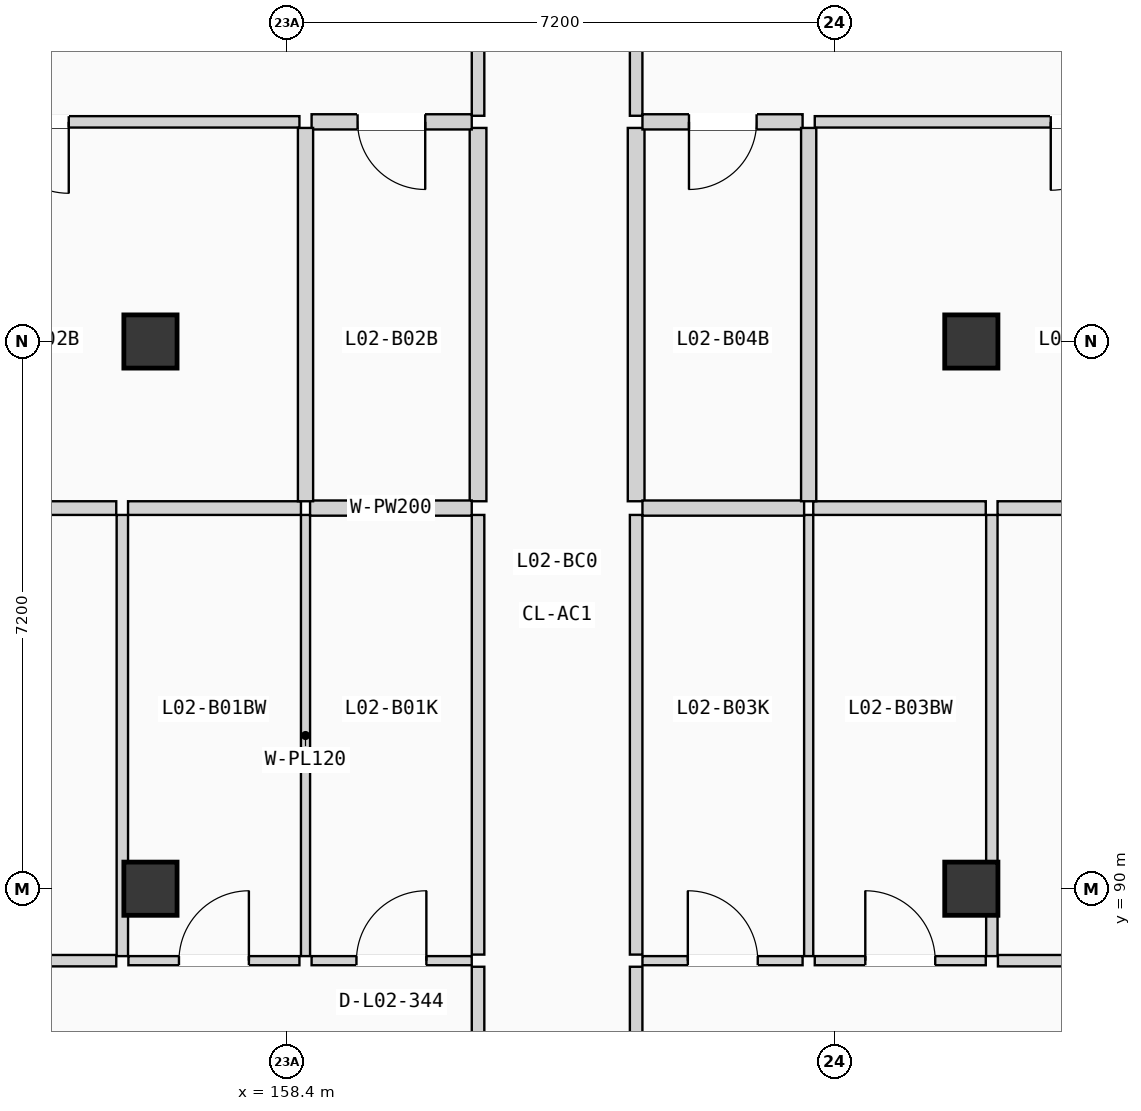
"""IFC4 building model, lengths in metres.
Left out: names, types, materials, properties, quantities, classifications, styles, units other than length and angle.
Written with IfcOpenShell. Run it as: python <this file> out.ifc"""

import sys

from ifc_helpers import new_model, si_unit, direction, frame, frame_2d, origin, origin_2d, place, context, subcontext, project, spatial, rectangle, extrude, element, fill, save


model = new_model("IFC4")
c1 = context("Model", 3, precision=1e-05, world=origin(), true_north=direction((0.0, 1.0)))
c2 = subcontext(c1, "Body", "Model", "MODEL_VIEW")
j1 = project(units=[si_unit("LENGTHUNIT", "METRE"), si_unit("PLANEANGLEUNIT", "RADIAN")], contexts=[c1])
p1 = place(None, origin())
s1 = spatial("IfcSite", under=j1, at=p1, CompositionType="ELEMENT")
p2 = place(p1, origin())
s2 = spatial("IfcBuilding", under=s1, at=p2, CompositionType="ELEMENT")
p3 = place(p2, frame((0.0, 0.0, 8.575)))
s3 = spatial("IfcBuildingStorey", under=s2, at=p3, CompositionType="ELEMENT", Elevation=8.575)
for number, where, z_axis, x_axis in (
    (1, (156.6, 90.0, 0.0), (0.0, 0.0, 1.0), (1.0, 0.0, 0.0)),
    (2, (156.6, 97.2, 0.0), (0.0, 0.0, 1.0), (1.0, 0.0, 0.0)),
    (3, (167.4, 90.0, 0.0), (0.0, 0.0, 1.0), (1.0, 0.0, 0.0)),
    (4, (167.4, 97.2, 0.0), (0.0, 0.0, 1.0), (1.0, 0.0, 0.0)),
):
    element("IfcColumn", number, at=place(p3, frame(where, z_axis=z_axis, x_axis=x_axis)), inside=s3, PredefinedType="COLUMN", context=c2, shape_type="SweptSolid", body=[
        extrude(rectangle(XDim=0.7, YDim=0.7, at=origin_2d()), origin(), (0.0, 0.0, 1.0), 3.5),
    ])
p4 = place(p3, frame((160.91, 81.945, 0.0), z_axis=(0.0, 0.0, 1.0), x_axis=(0.0, 1.0, 0.0)))
e5 = element("IfcWall", 5, at=p4, inside=s3, PredefinedType="PARTITIONING", context=c2, shape_type="SweptSolid", body=[
    extrude(rectangle(XDim=7.028, YDim=0.165, at=frame_2d((3.514, 0.0))), origin(), (0.0, 0.0, 1.0), 3.22),
])
p5 = place(p4, frame((3.009, 0.0, 0.0)))
e6 = element("IfcOpeningElement", 6, at=p5, cuts=e5, PredefinedType="OPENING", context=c2, shape_type="SweptSolid", body=[
    extrude(rectangle(XDim=1.01, YDim=2.11, at=frame_2d((0.505, 1.055))), frame((0.0, 0.093, 0.0), z_axis=(0.0, -1.0, 0.0), x_axis=(1.0, 0.0, 0.0)), (0.0, 0.0, 1.0), 0.185),
])
p6 = place(p3, frame((160.91, 89.133, 0.0), z_axis=(0.0, 0.0, 1.0), x_axis=(0.0, 1.0, 0.0)))
e7 = element("IfcWall", 7, at=p6, inside=s3, PredefinedType="PARTITIONING", context=c2, shape_type="SweptSolid", body=[
    extrude(rectangle(XDim=5.785, YDim=0.165, at=frame_2d((2.893, 0.0))), origin(), (0.0, 0.0, 1.0), 3.22),
])
p7 = place(p3, frame((160.91, 100.17, 0.0), z_axis=(0.0, 0.0, 1.0), x_axis=(0.0, 1.0, 0.0)))
e8 = element("IfcWall", 8, at=p7, inside=s3, PredefinedType="PARTITIONING", context=c2, shape_type="SweptSolid", body=[
    extrude(rectangle(XDim=5.958, YDim=0.165, at=frame_2d((2.979, 0.0))), origin(), (0.0, 0.0, 1.0), 3.22),
])
p8 = place(p7, frame((2.474, 0.0, 0.0)))
e9 = element("IfcOpeningElement", 9, at=p8, cuts=e8, PredefinedType="OPENING", context=c2, shape_type="SweptSolid", body=[
    extrude(rectangle(XDim=1.01, YDim=2.11, at=frame_2d((0.505, 1.055))), frame((0.0, 0.093, 0.0), z_axis=(0.0, -1.0, 0.0), x_axis=(1.0, 0.0, 0.0)), (0.0, 0.0, 1.0), 0.185),
])
p9 = place(p3, frame((160.91, 95.098, 0.0), z_axis=(0.0, 0.0, 1.0), x_axis=(0.0, 1.0, 0.0)))
e10 = element("IfcWall", 10, at=p9, inside=s3, PredefinedType="PLUMBINGWALL", context=c2, shape_type="SweptSolid", body=[
    extrude(rectangle(XDim=4.912, YDim=0.22, at=frame_2d((2.456, 0.0))), origin(), (0.0, 0.0, 1.0), 3.22),
])
p10 = place(p3, frame((162.99, 81.945, 0.0), z_axis=(0.0, 0.0, 1.0), x_axis=(0.0, 1.0, 0.0)))
e11 = element("IfcWall", 11, at=p10, inside=s3, PredefinedType="PARTITIONING", context=c2, shape_type="SweptSolid", body=[
    extrude(rectangle(XDim=7.028, YDim=0.165, at=frame_2d((3.514, 0.0))), origin(), (0.0, 0.0, 1.0), 3.22),
])
p11 = place(p10, frame((3.009, 0.0, 0.0)))
e12 = element("IfcOpeningElement", 12, at=p11, cuts=e11, PredefinedType="OPENING", context=c2, shape_type="SweptSolid", body=[
    extrude(rectangle(XDim=1.01, YDim=2.11, at=frame_2d((0.505, 1.055))), frame((0.0, 0.093, 0.0), z_axis=(0.0, -1.0, 0.0), x_axis=(1.0, 0.0, 0.0)), (0.0, 0.0, 1.0), 0.185),
])
p12 = place(p3, frame((162.99, 89.133, 0.0), z_axis=(0.0, 0.0, 1.0), x_axis=(0.0, 1.0, 0.0)))
e13 = element("IfcWall", 13, at=p12, inside=s3, PredefinedType="PARTITIONING", context=c2, shape_type="SweptSolid", body=[
    extrude(rectangle(XDim=5.785, YDim=0.165, at=frame_2d((2.893, 0.0))), origin(), (0.0, 0.0, 1.0), 3.22),
])
p13 = place(p3, frame((162.99, 100.17, 0.0), z_axis=(0.0, 0.0, 1.0), x_axis=(0.0, 1.0, 0.0)))
e14 = element("IfcWall", 14, at=p13, inside=s3, PredefinedType="PARTITIONING", context=c2, shape_type="SweptSolid", body=[
    extrude(rectangle(XDim=5.958, YDim=0.165, at=frame_2d((2.979, 0.0))), origin(), (0.0, 0.0, 1.0), 3.22),
])
p14 = place(p13, frame((2.474, 0.0, 0.0)))
e15 = element("IfcOpeningElement", 15, at=p14, cuts=e14, PredefinedType="OPENING", context=c2, shape_type="SweptSolid", body=[
    extrude(rectangle(XDim=1.01, YDim=2.11, at=frame_2d((0.505, 1.055))), frame((0.0, 0.093, 0.0), z_axis=(0.0, -1.0, 0.0), x_axis=(1.0, 0.0, 0.0)), (0.0, 0.0, 1.0), 0.185),
])
p15 = place(p3, frame((162.99, 95.098, 0.0), z_axis=(0.0, 0.0, 1.0), x_axis=(0.0, 1.0, 0.0)))
e16 = element("IfcWall", 16, at=p15, inside=s3, PredefinedType="PLUMBINGWALL", context=c2, shape_type="SweptSolid", body=[
    extrude(rectangle(XDim=4.912, YDim=0.22, at=frame_2d((2.456, 0.0))), origin(), (0.0, 0.0, 1.0), 3.22),
])
p16 = place(p3, frame((158.72, 89.053, 0.0), z_axis=(0.0, 0.0, 1.0), x_axis=(1.0, 0.0, 0.0)))
e17 = element("IfcWall", 17, at=p16, inside=s3, PredefinedType="PARTITIONING", context=c2, shape_type="SweptSolid", body=[
    extrude(rectangle(XDim=2.107, YDim=0.12, at=frame_2d((1.053, 0.0))), origin(), (0.0, 0.0, 1.0), 3.22),
])
p17 = place(p16, frame((0.59, 0.0, 0.0)))
e18 = element("IfcOpeningElement", 18, at=p17, cuts=e17, PredefinedType="OPENING", context=c2, shape_type="SweptSolid", body=[
    extrude(rectangle(XDim=0.92, YDim=2.02, at=frame_2d((0.46, 1.01))), frame((0.0, 0.07, 0.0), z_axis=(0.0, -1.0, 0.0), x_axis=(1.0, 0.0, 0.0)), (0.0, 0.0, 1.0), 0.14),
])
p18 = place(p3, frame((151.54, 89.053, 0.0), z_axis=(0.0, 0.0, 1.0), x_axis=(1.0, 0.0, 0.0)))
e19 = element("IfcWall", 19, at=p18, inside=s3, PredefinedType="PARTITIONING", context=c2, shape_type="SweptSolid", body=[
    extrude(rectangle(XDim=4.61, YDim=0.15, at=frame_2d((2.305, 0.0))), origin(), (0.0, 0.0, 1.0), 3.22),
])
p19 = place(p18, frame((1.77, 0.0, 0.0)))
e20 = element("IfcOpeningElement", 20, at=p19, cuts=e19, PredefinedType="OPENING", context=c2, shape_type="SweptSolid", body=[
    extrude(rectangle(XDim=1.08, YDim=2.1, at=frame_2d((0.54, 1.05))), frame((0.0, 0.085, 0.0), z_axis=(0.0, -1.0, 0.0), x_axis=(1.0, 0.0, 0.0)), (0.0, 0.0, 1.0), 0.17),
])
p20 = place(p3, frame((156.31, 89.053, 0.0), z_axis=(0.0, 0.0, 1.0), x_axis=(1.0, 0.0, 0.0)))
e21 = element("IfcWall", 21, at=p20, inside=s3, PredefinedType="PARTITIONING", context=c2, shape_type="SweptSolid", body=[
    extrude(rectangle(XDim=2.25, YDim=0.12, at=frame_2d((1.125, 0.0))), origin(), (0.0, 0.0, 1.0), 3.22),
])
p21 = place(p20, frame((0.665, 0.0, 0.0)))
e22 = element("IfcOpeningElement", 22, at=p21, cuts=e21, PredefinedType="OPENING", context=c2, shape_type="SweptSolid", body=[
    extrude(rectangle(XDim=0.92, YDim=2.02, at=frame_2d((0.46, 1.01))), frame((0.0, 0.07, 0.0), z_axis=(0.0, -1.0, 0.0), x_axis=(1.0, 0.0, 0.0)), (0.0, 0.0, 1.0), 0.14),
])
p22 = place(p3, frame((158.64, 89.113, 0.0), z_axis=(0.0, 0.0, 1.0), x_axis=(0.0, 1.0, 0.0)))
e23 = element("IfcWall", 23, at=p22, inside=s3, PredefinedType="PARTITIONING", context=c2, shape_type="SweptSolid", body=[
    extrude(rectangle(XDim=5.805, YDim=0.12, at=frame_2d((2.902, 0.0))), origin(), (0.0, 0.0, 1.0), 3.22),
])
p23 = place(p3, frame((158.7, 95.008, 0.0), z_axis=(0.0, 0.0, 1.0), x_axis=(1.0, 0.0, 0.0)))
e24 = element("IfcWall", 24, at=p23, inside=s3, PredefinedType="PLUMBINGWALL", context=c2, shape_type="SweptSolid", body=[
    extrude(rectangle(XDim=2.127, YDim=0.2, at=frame_2d((1.063, 0.0))), origin(), (0.0, 0.0, 1.0), 3.22),
])
p24 = place(p3, frame((156.23, 89.113, 0.0), z_axis=(0.0, 0.0, 1.0), x_axis=(0.0, 1.0, 0.0)))
e25 = element("IfcWall", 25, at=p24, inside=s3, PredefinedType="PARTITIONING", context=c2, shape_type="SweptSolid", body=[
    extrude(rectangle(XDim=5.805, YDim=0.15, at=frame_2d((2.902, 0.0))), origin(), (0.0, 0.0, 1.0), 3.22),
])
p25 = place(p3, frame((151.54, 95.008, 0.0), z_axis=(0.0, 0.0, 1.0), x_axis=(1.0, 0.0, 0.0)))
e26 = element("IfcWall", 26, at=p25, inside=s3, PredefinedType="PARTITIONING", context=c2, shape_type="SweptSolid", body=[
    extrude(rectangle(XDim=4.61, YDim=0.18, at=frame_2d((2.305, 0.0))), origin(), (0.0, 0.0, 1.0), 3.22),
])
p26 = place(p3, frame((156.305, 95.008, 0.0), z_axis=(0.0, 0.0, 1.0), x_axis=(1.0, 0.0, 0.0)))
e27 = element("IfcWall", 27, at=p26, inside=s3, PredefinedType="PARTITIONING", context=c2, shape_type="SweptSolid", body=[
    extrude(rectangle(XDim=2.275, YDim=0.18, at=frame_2d((1.138, 0.0))), origin(), (0.0, 0.0, 1.0), 3.22),
])
p27 = place(p3, frame((158.72, 100.09, 0.0), z_axis=(0.0, 0.0, 1.0), x_axis=(1.0, 0.0, 0.0)))
e28 = element("IfcWall", 28, at=p27, inside=s3, PredefinedType="PLUMBINGWALL", context=c2, shape_type="SweptSolid", body=[
    extrude(rectangle(XDim=2.107, YDim=0.2, at=frame_2d((1.053, 0.0))), origin(), (0.0, 0.0, 1.0), 3.22),
])
p28 = place(p27, frame((0.605, 0.0, 0.0)))
e29 = element("IfcOpeningElement", 29, at=p28, cuts=e28, PredefinedType="OPENING", context=c2, shape_type="SweptSolid", body=[
    extrude(rectangle(XDim=0.89, YDim=2.03, at=frame_2d((0.445, 1.015))), frame((0.0, 0.11, 0.0), z_axis=(0.0, -1.0, 0.0), x_axis=(1.0, 0.0, 0.0)), (0.0, 0.0, 1.0), 0.22),
])
p29 = place(p3, frame((151.54, 100.09, 0.0), z_axis=(0.0, 0.0, 1.0), x_axis=(1.0, 0.0, 0.0)))
e30 = element("IfcWall", 30, at=p29, inside=s3, PredefinedType="PARTITIONING", context=c2, shape_type="SweptSolid", body=[
    extrude(rectangle(XDim=7.02, YDim=0.15, at=frame_2d((3.51, 0.0))), origin(), (0.0, 0.0, 1.0), 3.22),
])
p30 = place(p29, frame((3.045, 0.0, 0.0)))
e31 = element("IfcOpeningElement", 31, at=p30, cuts=e30, PredefinedType="OPENING", context=c2, shape_type="SweptSolid", body=[
    extrude(rectangle(XDim=0.94, YDim=2.06, at=frame_2d((0.47, 1.03))), frame((0.0, 0.085, 0.0), z_axis=(0.0, -1.0, 0.0), x_axis=(1.0, 0.0, 0.0)), (0.0, 0.0, 1.0), 0.17),
])
p31 = place(p3, frame((158.64, 95.098, 0.0), z_axis=(0.0, 0.0, 1.0), x_axis=(0.0, 1.0, 0.0)))
e32 = element("IfcWall", 32, at=p31, inside=s3, PredefinedType="PLUMBINGWALL", context=c2, shape_type="SweptSolid", body=[
    extrude(rectangle(XDim=4.912, YDim=0.2, at=frame_2d((2.456, 0.0))), origin(), (0.0, 0.0, 1.0), 3.22),
])
p32 = place(p3, frame((163.073, 89.053, 0.0), z_axis=(0.0, 0.0, 1.0), x_axis=(1.0, 0.0, 0.0)))
e33 = element("IfcWall", 33, at=p32, inside=s3, PredefinedType="PARTITIONING", context=c2, shape_type="SweptSolid", body=[
    extrude(rectangle(XDim=2.107, YDim=0.12, at=frame_2d((1.053, 0.0))), origin(), (0.0, 0.0, 1.0), 3.22),
])
p33 = place(p32, frame((0.597, 0.0, 0.0)))
e34 = element("IfcOpeningElement", 34, at=p33, cuts=e33, PredefinedType="OPENING", context=c2, shape_type="SweptSolid", body=[
    extrude(rectangle(XDim=0.92, YDim=2.02, at=frame_2d((0.46, 1.01))), frame((0.0, 0.07, 0.0), z_axis=(0.0, -1.0, 0.0), x_axis=(1.0, 0.0, 0.0)), (0.0, 0.0, 1.0), 0.14),
])
p34 = place(p3, frame((167.75, 89.053, 0.0), z_axis=(0.0, 0.0, 1.0), x_axis=(1.0, 0.0, 0.0)))
e35 = element("IfcWall", 35, at=p34, inside=s3, PredefinedType="PARTITIONING", context=c2, shape_type="SweptSolid", body=[
    extrude(rectangle(XDim=4.71, YDim=0.15, at=frame_2d((2.355, 0.0))), origin(), (0.0, 0.0, 1.0), 3.22),
])
p35 = place(p34, frame((1.83, 0.0, 0.0)))
e36 = element("IfcOpeningElement", 36, at=p35, cuts=e35, PredefinedType="OPENING", context=c2, shape_type="SweptSolid", body=[
    extrude(rectangle(XDim=1.04, YDim=2.08, at=frame_2d((0.52, 1.04))), frame((0.0, 0.085, 0.0), z_axis=(0.0, -1.0, 0.0), x_axis=(1.0, 0.0, 0.0)), (0.0, 0.0, 1.0), 0.17),
])
p36 = place(p3, frame((165.34, 89.053, 0.0), z_axis=(0.0, 0.0, 1.0), x_axis=(1.0, 0.0, 0.0)))
e37 = element("IfcWall", 37, at=p36, inside=s3, PredefinedType="PARTITIONING", context=c2, shape_type="SweptSolid", body=[
    extrude(rectangle(XDim=2.25, YDim=0.12, at=frame_2d((1.125, 0.0))), origin(), (0.0, 0.0, 1.0), 3.22),
])
p37 = place(p36, frame((0.665, 0.0, 0.0)))
e38 = element("IfcOpeningElement", 38, at=p37, cuts=e37, PredefinedType="OPENING", context=c2, shape_type="SweptSolid", body=[
    extrude(rectangle(XDim=0.92, YDim=2.02, at=frame_2d((0.46, 1.01))), frame((0.0, 0.07, 0.0), z_axis=(0.0, -1.0, 0.0), x_axis=(1.0, 0.0, 0.0)), (0.0, 0.0, 1.0), 0.14),
])
p38 = place(p3, frame((165.26, 89.113, 0.0), z_axis=(0.0, 0.0, 1.0), x_axis=(0.0, 1.0, 0.0)))
e39 = element("IfcWall", 39, at=p38, inside=s3, PredefinedType="PARTITIONING", context=c2, shape_type="SweptSolid", body=[
    extrude(rectangle(XDim=5.805, YDim=0.12, at=frame_2d((2.902, 0.0))), origin(), (0.0, 0.0, 1.0), 3.22),
])
p39 = place(p3, frame((163.073, 95.008, 0.0), z_axis=(0.0, 0.0, 1.0), x_axis=(1.0, 0.0, 0.0)))
e40 = element("IfcWall", 40, at=p39, inside=s3, PredefinedType="PLUMBINGWALL", context=c2, shape_type="SweptSolid", body=[
    extrude(rectangle(XDim=2.127, YDim=0.2, at=frame_2d((1.063, 0.0))), origin(), (0.0, 0.0, 1.0), 3.22),
])
p40 = place(p3, frame((167.67, 89.113, 0.0), z_axis=(0.0, 0.0, 1.0), x_axis=(0.0, 1.0, 0.0)))
e41 = element("IfcWall", 41, at=p40, inside=s3, PredefinedType="PARTITIONING", context=c2, shape_type="SweptSolid", body=[
    extrude(rectangle(XDim=5.805, YDim=0.15, at=frame_2d((2.902, 0.0))), origin(), (0.0, 0.0, 1.0), 3.22),
])
p41 = place(p3, frame((167.745, 95.008, 0.0), z_axis=(0.0, 0.0, 1.0), x_axis=(1.0, 0.0, 0.0)))
e42 = element("IfcWall", 42, at=p41, inside=s3, PredefinedType="PARTITIONING", context=c2, shape_type="SweptSolid", body=[
    extrude(rectangle(XDim=4.715, YDim=0.18, at=frame_2d((2.357, 0.0))), origin(), (0.0, 0.0, 1.0), 3.22),
])
p42 = place(p3, frame((165.32, 95.008, 0.0), z_axis=(0.0, 0.0, 1.0), x_axis=(1.0, 0.0, 0.0)))
e43 = element("IfcWall", 43, at=p42, inside=s3, PredefinedType="PARTITIONING", context=c2, shape_type="SweptSolid", body=[
    extrude(rectangle(XDim=2.27, YDim=0.18, at=frame_2d((1.135, 0.0))), origin(), (0.0, 0.0, 1.0), 3.22),
])
p43 = place(p3, frame((163.073, 100.09, 0.0), z_axis=(0.0, 0.0, 1.0), x_axis=(1.0, 0.0, 0.0)))
e44 = element("IfcWall", 44, at=p43, inside=s3, PredefinedType="PLUMBINGWALL", context=c2, shape_type="SweptSolid", body=[
    extrude(rectangle(XDim=2.107, YDim=0.2, at=frame_2d((1.053, 0.0))), origin(), (0.0, 0.0, 1.0), 3.22),
])
p44 = place(p43, frame((0.612, 0.0, 0.0)))
e45 = element("IfcOpeningElement", 45, at=p44, cuts=e44, PredefinedType="OPENING", context=c2, shape_type="SweptSolid", body=[
    extrude(rectangle(XDim=0.89, YDim=2.03, at=frame_2d((0.445, 1.015))), frame((0.0, 0.11, 0.0), z_axis=(0.0, -1.0, 0.0), x_axis=(1.0, 0.0, 0.0)), (0.0, 0.0, 1.0), 0.22),
])
p45 = place(p3, frame((165.34, 100.09, 0.0), z_axis=(0.0, 0.0, 1.0), x_axis=(1.0, 0.0, 0.0)))
e46 = element("IfcWall", 46, at=p45, inside=s3, PredefinedType="PARTITIONING", context=c2, shape_type="SweptSolid", body=[
    extrude(rectangle(XDim=7.12, YDim=0.15, at=frame_2d((3.56, 0.0))), origin(), (0.0, 0.0, 1.0), 3.22),
])
p46 = place(p45, frame((3.105, 0.0, 0.0)))
e47 = element("IfcOpeningElement", 47, at=p46, cuts=e46, PredefinedType="OPENING", context=c2, shape_type="SweptSolid", body=[
    extrude(rectangle(XDim=0.9, YDim=2.04, at=frame_2d((0.45, 1.02))), frame((0.0, 0.085, 0.0), z_axis=(0.0, -1.0, 0.0), x_axis=(1.0, 0.0, 0.0)), (0.0, 0.0, 1.0), 0.17),
])
p47 = place(p3, frame((165.26, 95.098, 0.0), z_axis=(0.0, 0.0, 1.0), x_axis=(0.0, 1.0, 0.0)))
e48 = element("IfcWall", 48, at=p47, inside=s3, PredefinedType="PLUMBINGWALL", context=c2, shape_type="SweptSolid", body=[
    extrude(rectangle(XDim=4.912, YDim=0.2, at=frame_2d((2.456, 0.0))), origin(), (0.0, 0.0, 1.0), 3.22),
])
p48 = place(p17, origin())
e49 = element("IfcDoor", 49, at=p48, inside=s3, OperationType="SINGLE_SWING_RIGHT", PredefinedType="DOOR", context=c2, shape_type="SweptSolid", body=[
    extrude(rectangle(XDim=0.92, YDim=2.02, at=frame_2d((0.46, 1.01))), frame((0.0, 0.025, 0.0), z_axis=(0.0, -1.0, 0.0), x_axis=(1.0, 0.0, 0.0)), (0.0, 0.0, 1.0), 0.05),
])
fill(e18, e49)
p49 = place(p21, origin())
e50 = element("IfcDoor", 50, at=p49, inside=s3, OperationType="SINGLE_SWING_RIGHT", PredefinedType="DOOR", context=c2, shape_type="SweptSolid", body=[
    extrude(rectangle(XDim=0.92, YDim=2.02, at=frame_2d((0.46, 1.01))), frame((0.0, 0.025, 0.0), z_axis=(0.0, -1.0, 0.0), x_axis=(1.0, 0.0, 0.0)), (0.0, 0.0, 1.0), 0.05),
])
fill(e22, e50)
p50 = place(p28, frame((0.89, 0.0, 0.0), z_axis=(0.0, 0.0, 1.0), x_axis=(-1.0, 0.0, 0.0)))
e51 = element("IfcDoor", 51, at=p50, inside=s3, OperationType="SINGLE_SWING_RIGHT", PredefinedType="DOOR", context=c2, shape_type="SweptSolid", body=[
    extrude(rectangle(XDim=0.89, YDim=2.03, at=frame_2d((0.445, 1.015))), frame((0.0, 0.025, 0.0), z_axis=(0.0, -1.0, 0.0), x_axis=(1.0, 0.0, 0.0)), (0.0, 0.0, 1.0), 0.05),
])
fill(e29, e51)
p51 = place(p30, frame((0.94, 0.0, 0.0), z_axis=(0.0, 0.0, 1.0), x_axis=(-1.0, 0.0, 0.0)))
e52 = element("IfcDoor", 52, at=p51, inside=s3, OperationType="SINGLE_SWING_RIGHT", PredefinedType="DOOR", context=c2, shape_type="SweptSolid", body=[
    extrude(rectangle(XDim=0.94, YDim=2.06, at=frame_2d((0.47, 1.03))), frame((0.0, 0.025, 0.0), z_axis=(0.0, -1.0, 0.0), x_axis=(1.0, 0.0, 0.0)), (0.0, 0.0, 1.0), 0.05),
])
fill(e31, e52)
p52 = place(p33, origin())
e53 = element("IfcDoor", 53, at=p52, inside=s3, OperationType="SINGLE_SWING_LEFT", PredefinedType="DOOR", context=c2, shape_type="SweptSolid", body=[
    extrude(rectangle(XDim=0.92, YDim=2.02, at=frame_2d((0.46, 1.01))), frame((0.0, 0.025, 0.0), z_axis=(0.0, -1.0, 0.0), x_axis=(1.0, 0.0, 0.0)), (0.0, 0.0, 1.0), 0.05),
])
fill(e34, e53)
p53 = place(p37, origin())
e54 = element("IfcDoor", 54, at=p53, inside=s3, OperationType="SINGLE_SWING_LEFT", PredefinedType="DOOR", context=c2, shape_type="SweptSolid", body=[
    extrude(rectangle(XDim=0.92, YDim=2.02, at=frame_2d((0.46, 1.01))), frame((0.0, 0.025, 0.0), z_axis=(0.0, -1.0, 0.0), x_axis=(1.0, 0.0, 0.0)), (0.0, 0.0, 1.0), 0.05),
])
fill(e38, e54)
p54 = place(p44, frame((0.89, 0.0, 0.0), z_axis=(0.0, 0.0, 1.0), x_axis=(-1.0, 0.0, 0.0)))
e55 = element("IfcDoor", 55, at=p54, inside=s3, OperationType="SINGLE_SWING_LEFT", PredefinedType="DOOR", context=c2, shape_type="SweptSolid", body=[
    extrude(rectangle(XDim=0.89, YDim=2.03, at=frame_2d((0.445, 1.015))), frame((0.0, 0.025, 0.0), z_axis=(0.0, -1.0, 0.0), x_axis=(1.0, 0.0, 0.0)), (0.0, 0.0, 1.0), 0.05),
])
fill(e45, e55)
p55 = place(p46, frame((0.9, 0.0, 0.0), z_axis=(0.0, 0.0, 1.0), x_axis=(-1.0, 0.0, 0.0)))
e56 = element("IfcDoor", 56, at=p55, inside=s3, OperationType="SINGLE_SWING_LEFT", PredefinedType="DOOR", context=c2, shape_type="SweptSolid", body=[
    extrude(rectangle(XDim=0.9, YDim=2.04, at=frame_2d((0.45, 1.02))), frame((0.0, 0.025, 0.0), z_axis=(0.0, -1.0, 0.0), x_axis=(1.0, 0.0, 0.0)), (0.0, 0.0, 1.0), 0.05),
])
fill(e47, e56)
save(model, sys.argv[1])
